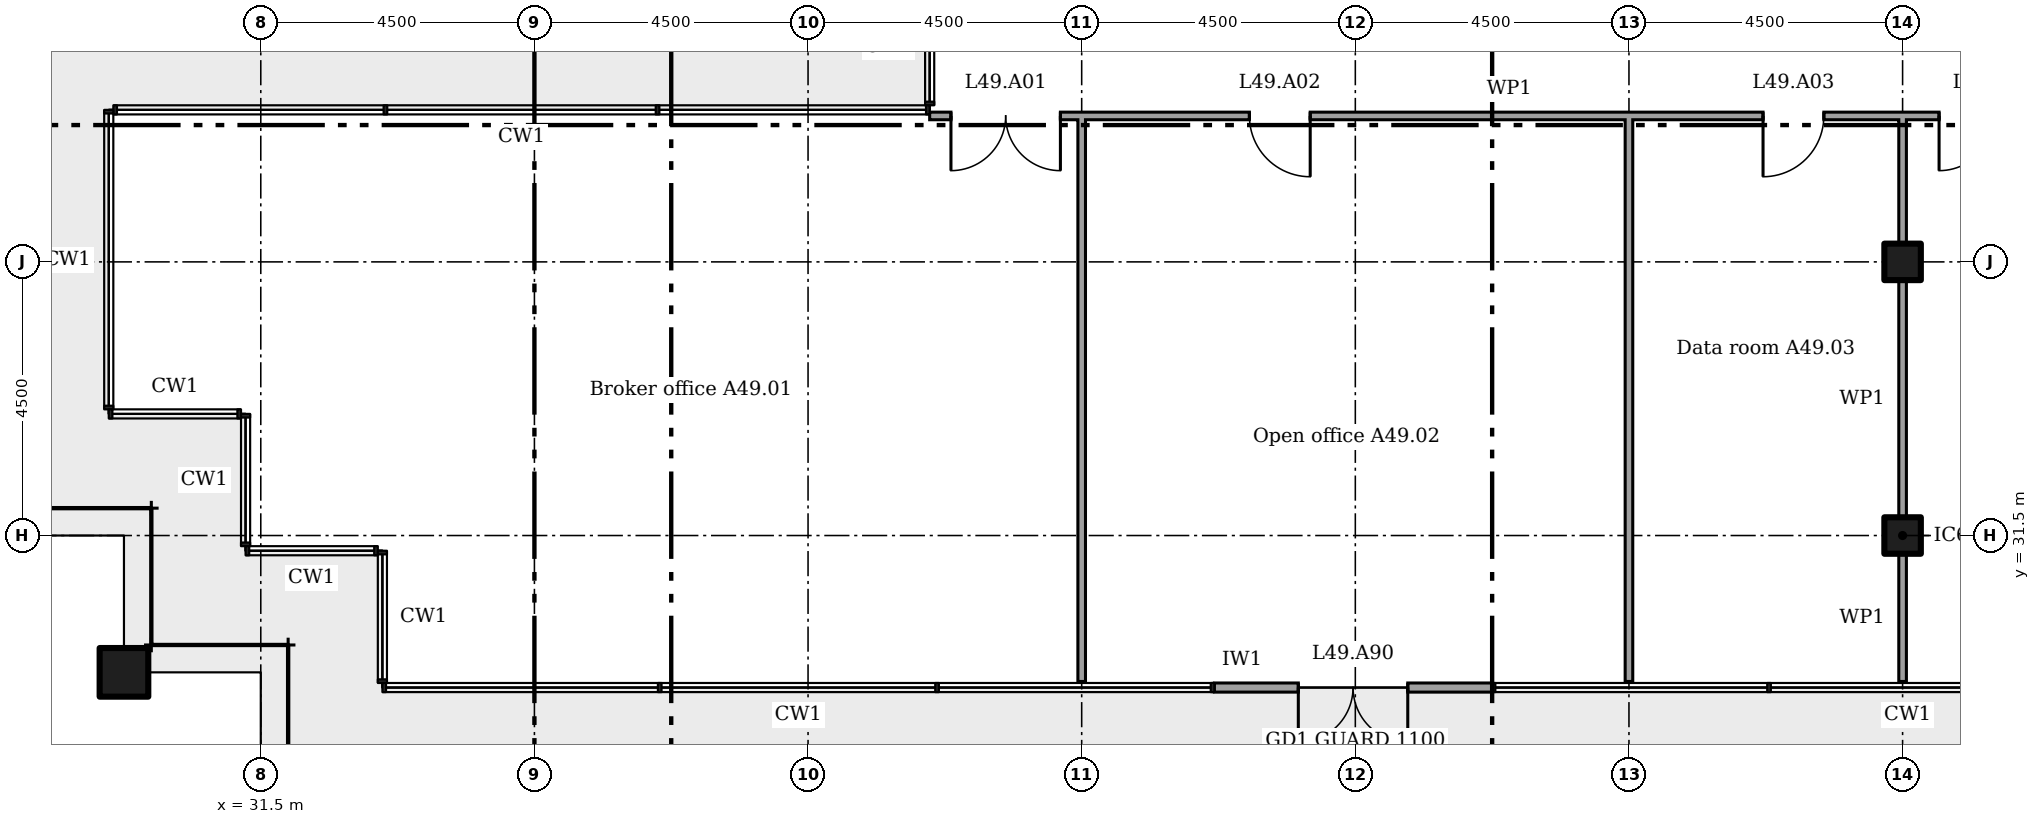
"""IFC4 building model, lengths in metres.
Left out: names, types, materials, properties, quantities, classifications, styles, units other than length and angle.
Written with IfcOpenShell. Run it as: python <this file> out.ifc"""

import sys

from ifc_helpers import new_model, si_unit, direction, frame, frame_2d, origin, origin_2d, place, context, subcontext, project, spatial, rectangle, extrude, element, fill, save


model = new_model("IFC4")
c1 = context("Model", 3, precision=1e-05, world=origin(), true_north=direction((0.0, 1.0)))
c2 = subcontext(c1, "Body", "Model", "MODEL_VIEW")
j1 = project(units=[si_unit("LENGTHUNIT", "METRE"), si_unit("PLANEANGLEUNIT", "RADIAN")], contexts=[c1])
p1 = place(None, origin())
s1 = spatial("IfcSite", under=j1, at=p1, CompositionType="ELEMENT")
p2 = place(p1, origin())
s2 = spatial("IfcBuilding", under=s1, at=p2, CompositionType="ELEMENT")
p3 = place(p2, frame((0.0, 0.0, 195.6)))
s3 = spatial("IfcBuildingStorey", under=s2, at=p3, CompositionType="ELEMENT", Elevation=195.6)
p4 = place(p3, frame((29.25, 29.25, 0.0)))
e1 = element("IfcColumn", 1, at=p4, inside=s3, PredefinedType="COLUMN", context=c2, shape_type="SweptSolid", body=[
    extrude(rectangle(XDim=0.8, YDim=0.8, at=origin_2d()), origin(), (0.0, 0.0, 1.0), 3.6),
])
for number, where in (
    (2, (58.5, 31.5, 0.0)),
    (3, (58.5, 36.0, 0.0)),
):
    element("IfcColumn", number, at=place(p3, frame(where)), inside=s3, PredefinedType="COLUMN", context=c2, shape_type="SweptSolid", body=[
        extrude(rectangle(XDim=0.6, YDim=0.6, at=origin_2d()), origin(), (0.0, 0.0, 1.0), 3.6),
    ])
p5 = place(p3, frame((47.182, 29.0, 0.0)))
e4 = element("IfcWall", 4, at=p5, inside=s3, PredefinedType="SOLIDWALL", context=c2, shape_type="SweptSolid", body=[
    extrude(rectangle(XDim=4.561, YDim=0.15, at=frame_2d((2.28, 0.0))), origin(), (0.0, 0.0, 1.0), 3.1),
])
p6 = place(p5, frame((1.38, 0.0, 0.0)))
e5 = element("IfcOpeningElement", 5, at=p6, cuts=e4, PredefinedType="OPENING", context=c2, shape_type="SweptSolid", body=[
    extrude(rectangle(XDim=1.8, YDim=2.4, at=frame_2d((0.9, 1.2))), frame((0.0, 0.085, 0.0), z_axis=(0.0, -1.0, 0.0), x_axis=(1.0, 0.0, 0.0)), (0.0, 0.0, 1.0), 0.17),
])
p7 = place(p3, frame((42.5, 38.4, 0.0)))
e6 = element("IfcWall", 6, at=p7, inside=s3, PredefinedType="PARTITIONING", context=c2, shape_type="SweptSolid", body=[
    extrude(rectangle(XDim=19.062, YDim=0.125, at=frame_2d((9.531, 0.0))), origin(), (0.0, 0.0, 1.0), 3.45),
])
p8 = place(p7, frame((0.35, 0.0, 0.0)))
e7 = element("IfcOpeningElement", 7, at=p8, cuts=e6, PredefinedType="OPENING", context=c2, shape_type="SweptSolid", body=[
    extrude(rectangle(XDim=1.8, YDim=2.1, at=frame_2d((0.9, 1.05))), frame((0.0, 0.073, 0.0), z_axis=(0.0, -1.0, 0.0), x_axis=(1.0, 0.0, 0.0)), (0.0, 0.0, 1.0), 0.145),
])
p9 = place(p7, frame((5.258, 0.0, 0.0)))
e8 = element("IfcOpeningElement", 8, at=p9, cuts=e6, PredefinedType="OPENING", context=c2, shape_type="SweptSolid", body=[
    extrude(rectangle(XDim=1.0, YDim=2.1, at=frame_2d((0.5, 1.05))), frame((0.0, 0.073, 0.0), z_axis=(0.0, -1.0, 0.0), x_axis=(1.0, 0.0, 0.0)), (0.0, 0.0, 1.0), 0.145),
])
p10 = place(p7, frame((13.705, 0.0, 0.0)))
e9 = element("IfcOpeningElement", 9, at=p10, cuts=e6, PredefinedType="OPENING", context=c2, shape_type="SweptSolid", body=[
    extrude(rectangle(XDim=1.0, YDim=2.1, at=frame_2d((0.5, 1.05))), frame((0.0, 0.073, 0.0), z_axis=(0.0, -1.0, 0.0), x_axis=(1.0, 0.0, 0.0)), (0.0, 0.0, 1.0), 0.145),
])
p11 = place(p7, frame((16.6, 0.0, 0.0)))
e10 = element("IfcOpeningElement", 10, at=p11, cuts=e6, PredefinedType="OPENING", context=c2, shape_type="SweptSolid", body=[
    extrude(rectangle(XDim=1.8, YDim=2.1, at=frame_2d((0.9, 1.05))), frame((0.0, 0.073, 0.0), z_axis=(0.0, -1.0, 0.0), x_axis=(1.0, 0.0, 0.0)), (0.0, 0.0, 1.0), 0.145),
])
for number, where, z_axis, x_axis in (
    (11, (45.0, 29.1, 0.0), (0.0, 0.0, 1.0), (0.0, 1.0, 0.0)),
    (12, (54.0, 29.1, 0.0), (0.0, 0.0, 1.0), (0.0, 1.0, 0.0)),
):
    element("IfcWall", number, at=place(p3, frame(where, z_axis=z_axis, x_axis=x_axis)), inside=s3, PredefinedType="PARTITIONING", context=c2, shape_type="SweptSolid", body=[
        extrude(rectangle(XDim=9.3, YDim=0.125, at=frame_2d((4.65, 0.0))), origin(), (0.0, 0.0, 1.0), 2.772),
    ])
p12 = place(p3, frame((58.5, 29.1, 0.0), z_axis=(0.0, 0.0, 1.0), x_axis=(0.0, 1.0, 0.0)))
e13 = element("IfcWall", 13, at=p12, inside=s3, PredefinedType="PARTITIONING", context=c2, shape_type="SweptSolid", body=[
    extrude(rectangle(XDim=2.1, YDim=0.125, at=frame_2d((1.05, 0.0))), origin(), (0.0, 0.0, 1.0), 2.676),
])
p13 = place(p3, frame((58.5, 31.8, 0.0), z_axis=(0.0, 0.0, 1.0), x_axis=(0.0, 1.0, 0.0)))
e14 = element("IfcWall", 14, at=p13, inside=s3, PredefinedType="PARTITIONING", context=c2, shape_type="SweptSolid", body=[
    extrude(rectangle(XDim=3.9, YDim=0.125, at=frame_2d((1.95, 0.0))), origin(), (0.0, 0.0, 1.0), 2.676),
])
p14 = place(p3, frame((58.5, 36.3, 0.0), z_axis=(0.0, 0.0, 1.0), x_axis=(0.0, 1.0, 0.0)))
e15 = element("IfcWall", 15, at=p14, inside=s3, PredefinedType="PARTITIONING", context=c2, shape_type="SweptSolid", body=[
    extrude(rectangle(XDim=2.1, YDim=0.125, at=frame_2d((1.05, 0.0))), origin(), (0.0, 0.0, 1.0), 2.676),
])
p15 = place(p6, frame((1.8, 0.0, 0.0), x_axis=(-1.0, 0.0, 0.0)))
e16 = element("IfcDoor", 16, at=p15, inside=s3, OperationType="DOUBLE_DOOR_DOUBLE_SWING", PredefinedType="NOTDEFINED", context=c2, shape_type="SweptSolid", body=[
    extrude(rectangle(XDim=1.8, YDim=2.4, at=frame_2d((0.9, 1.2))), frame((0.0, 0.025, 0.0), z_axis=(0.0, -1.0, 0.0), x_axis=(1.0, 0.0, 0.0)), (0.0, 0.0, 1.0), 0.05),
])
fill(e5, e16)
p16 = place(p8, frame((1.8, 0.0, 0.0), x_axis=(-1.0, 0.0, 0.0)))
e17 = element("IfcDoor", 17, at=p16, inside=s3, OperationType="DOUBLE_DOOR_SINGLE_SWING", PredefinedType="DOOR", context=c2, shape_type="SweptSolid", body=[
    extrude(rectangle(XDim=1.8, YDim=2.1, at=frame_2d((0.9, 1.05))), frame((0.0, 0.025, 0.0), z_axis=(0.0, -1.0, 0.0), x_axis=(1.0, 0.0, 0.0)), (0.0, 0.0, 1.0), 0.05),
])
fill(e7, e17)
p17 = place(p9, frame((1.0, 0.0, 0.0), x_axis=(-1.0, 0.0, 0.0)))
e18 = element("IfcDoor", 18, at=p17, inside=s3, OperationType="SINGLE_SWING_RIGHT", PredefinedType="DOOR", context=c2, shape_type="SweptSolid", body=[
    extrude(rectangle(XDim=1.0, YDim=2.1, at=frame_2d((0.5, 1.05))), frame((0.0, 0.025, 0.0), z_axis=(0.0, -1.0, 0.0), x_axis=(1.0, 0.0, 0.0)), (0.0, 0.0, 1.0), 0.05),
])
fill(e8, e18)
p18 = place(p10, frame((1.0, 0.0, 0.0), x_axis=(-1.0, 0.0, 0.0)))
e19 = element("IfcDoor", 19, at=p18, inside=s3, OperationType="SINGLE_SWING_LEFT", PredefinedType="DOOR", context=c2, shape_type="SweptSolid", body=[
    extrude(rectangle(XDim=1.0, YDim=2.1, at=frame_2d((0.5, 1.05))), frame((0.0, 0.025, 0.0), z_axis=(0.0, -1.0, 0.0), x_axis=(1.0, 0.0, 0.0)), (0.0, 0.0, 1.0), 0.05),
])
fill(e9, e19)
p19 = place(p11, frame((1.8, 0.0, 0.0), x_axis=(-1.0, 0.0, 0.0)))
e20 = element("IfcDoor", 20, at=p19, inside=s3, OperationType="DOUBLE_DOOR_SINGLE_SWING", PredefinedType="DOOR", context=c2, shape_type="SweptSolid", body=[
    extrude(rectangle(XDim=1.8, YDim=2.1, at=frame_2d((0.9, 1.05))), frame((0.0, 0.025, 0.0), z_axis=(0.0, -1.0, 0.0), x_axis=(1.0, 0.0, 0.0)), (0.0, 0.0, 1.0), 0.05),
])
fill(e10, e20)
save(model, sys.argv[1])
